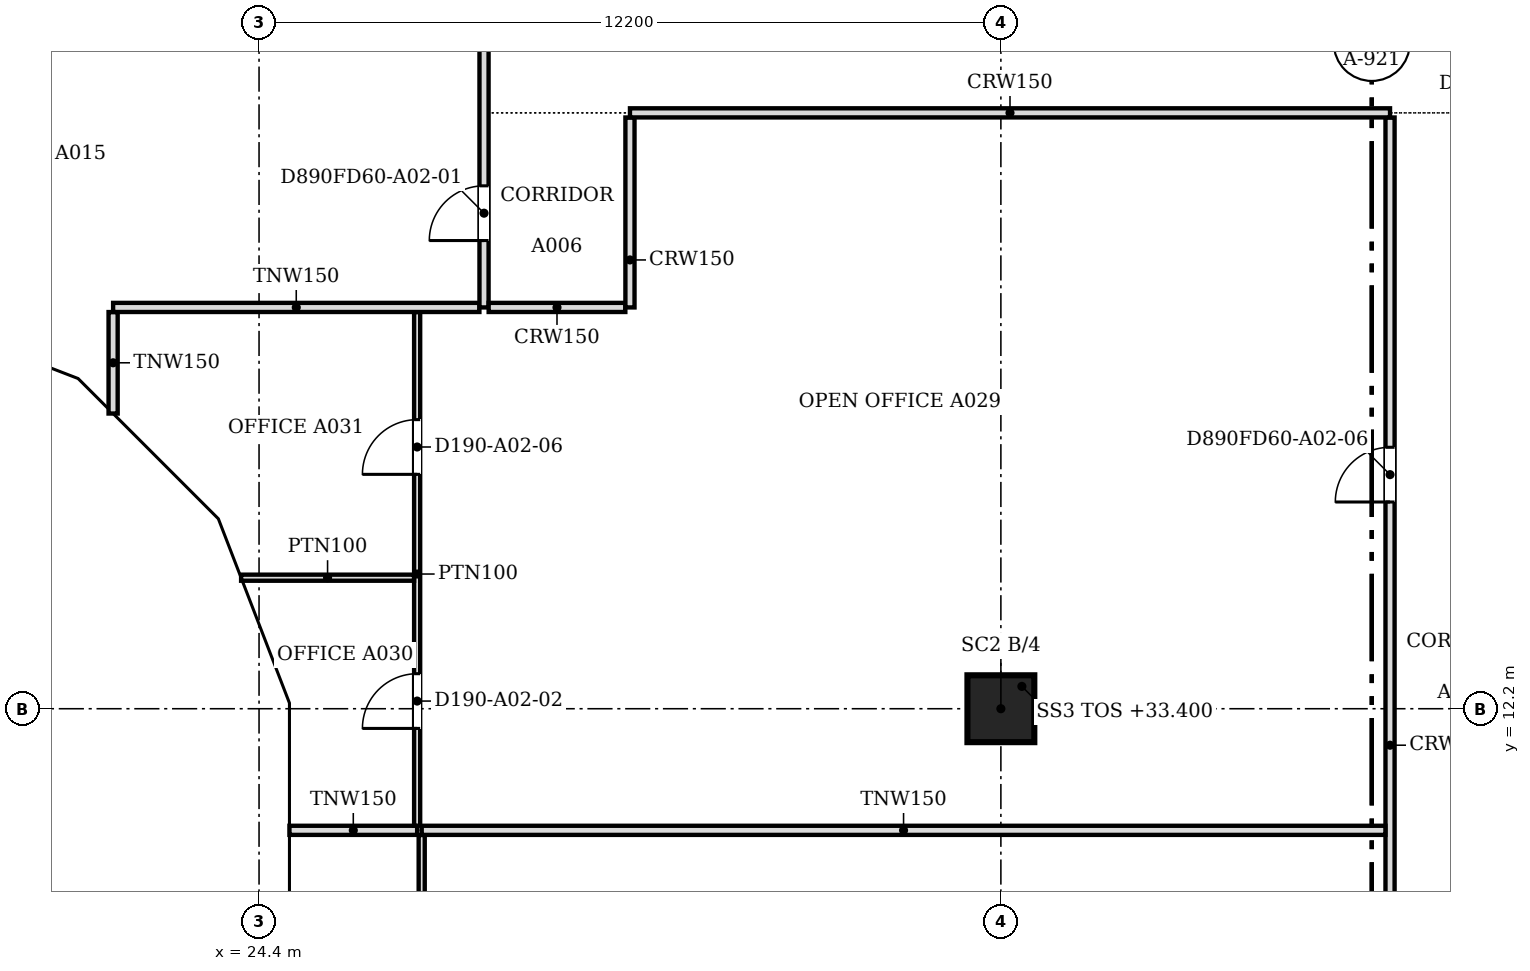
"""IFC4 building model, lengths in metres.
Left out: names, types, materials, properties, quantities, classifications, styles, units other than length and angle.
Written with IfcOpenShell. Run it as: python <this file> out.ifc"""

import sys

from ifc_helpers import new_model, si_unit, direction, frame, frame_2d, origin, origin_2d, place, context, subcontext, project, spatial, polyline, rectangle, outline, extrude, faceted_brep, source, transform, mapped, element, fill, save


model = new_model("IFC4")
c1 = context("Model", 3, precision=1e-05, world=origin(), true_north=direction((0.0, 1.0)))
c2 = subcontext(c1, "Body", "Model", "MODEL_VIEW")
j1 = project(units=[si_unit("LENGTHUNIT", "METRE"), si_unit("PLANEANGLEUNIT", "RADIAN")], contexts=[c1])
p1 = place(None, origin())
s1 = spatial("IfcSite", under=j1, at=p1, CompositionType="ELEMENT")
p2 = place(p1, origin())
s2 = spatial("IfcBuilding", under=s1, at=p2, CompositionType="ELEMENT")
p3 = place(p2, frame((0.0, 0.0, 33.4)))
s3 = spatial("IfcBuildingStorey", under=s2, at=p3, CompositionType="ELEMENT", Elevation=33.4)
p4 = place(p3, frame((36.6, 12.2, 0.0), z_axis=(0.0, 0.0, 1.0), x_axis=(1.0, 0.0, 0.0)))
e1 = element("IfcColumn", 1, at=p4, inside=s3, PredefinedType="COLUMN", context=c2, shape_type="SweptSolid", body=[
    extrude(rectangle(XDim=1.1, YDim=1.1, at=origin_2d()), origin(), (0.0, 0.0, 1.0), 3.6),
])
m1 = source(origin(), c2, "Body", "Brep", [
    faceted_brep([(0.093, -0.25, 0.056), (3.143, -0.25, 3.736), (3.143, -0.25, 3.864), (0.093, -0.25, 7.544), (0.0, 0.25, 7.543), (0.047, 0.25, 7.6), (3.196, 0.25, 3.8), (0.047, 0.25, 0.0), (0.0, 0.25, 0.057), (3.196, -0.0, 3.8), (0.047, 0.0, 0.0), (0.047, 0.0, 7.6)], [[[0, 1, 2, 3]], [[4, 5, 6, 7, 8]], [[7, 6, 9, 1, 0, 10]], [[6, 5, 11, 3, 2, 9]], [[5, 4, 11]], [[8, 7, 10]], [[8, 10, 0, 3, 11, 4]], [[1, 9, 2]]]),
])
p5 = place(p3, frame((18.303, 18.567, -3.8), z_axis=(0.0, 0.0, 1.0), x_axis=(0.932978940178, -0.359930961693, 0.0)))
e2 = element("IfcWall", 2, at=p5, inside=s3, PredefinedType="SOLIDWALL", context=c2, shape_type="MappedRepresentation", body=[
    mapped(m1, transform((0.0, 0.0, 0.0), scale=1.0)),
])
m2 = source(origin(), c2, "Body", "SweptSolid", [
    extrude(outline(polyline([(0.247, 0.633), (2.871, 3.8), (0.247, 6.967), (0.247, 0.633)])), frame((0.0, 0.26, 0.0), z_axis=(0.0, -1.0, 0.0), x_axis=(1.0, 0.0, 0.0)), (0.0, 0.0, 1.0), 0.52),
])
p6 = place(p5, origin())
e3 = element("IfcOpeningElement", 3, at=p6, cuts=e2, PredefinedType="OPENING", context=c2, shape_type="MappedRepresentation", body=[
    mapped(m2, transform((0.0, 0.0, 0.0), scale=1.0)),
])
m3 = source(origin(), c2, "Body", "Brep", [
    faceted_brep([(3.103, -0.25, 7.536), (0.053, -0.25, 3.864), (0.053, -0.25, 3.736), (3.103, -0.25, 0.064), (0.0, 0.25, 3.8), (3.156, 0.25, 7.6), (3.209, 0.25, 7.536), (3.209, 0.25, 0.064), (3.156, 0.25, 0.0), (3.156, -0.0, 0.0), (3.156, -0.0, 7.6), (0.0, 0.0, 3.8)], [[[0, 1, 2, 3]], [[4, 5, 6, 7, 8]], [[8, 7, 9]], [[6, 5, 10]], [[5, 4, 11, 1, 0, 10]], [[4, 8, 9, 3, 2, 11]], [[11, 2, 1]], [[3, 9, 7, 6, 10, 0]]]),
])
p7 = place(p3, frame((21.285, 17.417, -3.8), z_axis=(0.0, 0.0, 1.0), x_axis=(0.707106781187, -0.707106781187, 0.0)))
e4 = element("IfcWall", 4, at=p7, inside=s3, PredefinedType="SOLIDWALL", context=c2, shape_type="MappedRepresentation", body=[
    mapped(m3, transform((0.0, 0.0, 0.0), scale=1.0)),
])
m4 = source(origin(), c2, "Body", "SweptSolid", [
    extrude(outline(polyline([(2.956, 6.968), (0.325, 3.8), (2.956, 0.632), (2.956, 6.968)])), frame((0.0, 0.26, 0.0), z_axis=(0.0, -1.0, 0.0), x_axis=(1.0, 0.0, 0.0)), (0.0, 0.0, 1.0), 0.52),
])
p8 = place(p7, origin())
e5 = element("IfcOpeningElement", 5, at=p8, cuts=e4, PredefinedType="OPENING", context=c2, shape_type="MappedRepresentation", body=[
    mapped(m4, transform((0.0, 0.0, 0.0), scale=1.0)),
])
m5 = source(origin(), c2, "Body", "Brep", [
    faceted_brep([(0.106, -0.25, 0.064), (3.156, -0.25, 3.744), (3.156, -0.25, 3.856), (0.106, -0.25, 7.536), (0.0, 0.25, 7.536), (0.053, 0.25, 7.6), (3.202, 0.25, 3.8), (0.053, 0.25, 0.0), (0.0, 0.25, 0.064), (3.202, -0.0, 3.8), (0.053, 0.0, 0.0), (0.053, 0.0, 7.6)], [[[0, 1, 2, 3]], [[4, 5, 6, 7, 8]], [[7, 6, 9, 1, 0, 10]], [[6, 5, 11, 3, 2, 9]], [[5, 4, 11]], [[8, 7, 10]], [[8, 10, 0, 3, 11, 4]], [[1, 9, 2]]]),
])
p9 = place(p3, frame((23.497, 15.234, -3.8), z_axis=(0.0, 0.0, 1.0), x_axis=(0.359913782069, -0.932985567668, 0.0)))
e6 = element("IfcWall", 6, at=p9, inside=s3, PredefinedType="SOLIDWALL", context=c2, shape_type="MappedRepresentation", body=[
    mapped(m5, transform((0.0, 0.0, 0.0), scale=1.0)),
])
m6 = source(origin(), c2, "Body", "SweptSolid", [
    extrude(outline(polyline([(0.253, 0.633), (2.878, 3.8), (0.253, 6.967), (0.253, 0.633)])), frame((0.0, 0.26, 0.0), z_axis=(0.0, -1.0, 0.0), x_axis=(1.0, 0.0, 0.0)), (0.0, 0.0, 1.0), 0.52),
])
p10 = place(p9, origin())
e7 = element("IfcOpeningElement", 7, at=p10, cuts=e6, PredefinedType="OPENING", context=c2, shape_type="MappedRepresentation", body=[
    mapped(m6, transform((0.0, 0.0, 0.0), scale=1.0)),
])
m7 = source(origin(), c2, "Body", "Brep", [
    faceted_brep([(3.096, -0.25, 0.0), (6.1, -0.25, 3.8), (3.096, -0.25, 7.6), (0.047, -0.25, 3.857), (0.047, -0.25, 3.743), (0.0, 0.25, 3.8), (3.096, 0.25, 7.6), (6.053, 0.25, 3.859), (6.053, 0.25, 3.741), (3.096, 0.25, 0.0), (6.1, -0.0, 3.8), (0.0, 0.0, 3.8)], [[[0, 1, 2, 3, 4]], [[5, 6, 7, 8, 9]], [[9, 8, 10, 1, 0]], [[7, 6, 2, 1, 10]], [[6, 5, 11, 3, 2]], [[5, 9, 0, 4, 11]], [[11, 4, 3]], [[10, 8, 7]]]),
])
p11 = place(p3, frame((24.65, 12.247, -3.8), z_axis=(0.0, 0.0, 1.0), x_axis=(0.0, -1.0, 0.0)))
e8 = element("IfcWall", 8, at=p11, inside=s3, PredefinedType="SOLIDWALL", context=c2, shape_type="MappedRepresentation", body=[
    mapped(m7, transform((0.0, 0.0, 0.0), scale=1.0)),
])
m8 = source(origin(), c2, "Body", "SweptSolid", [
    extrude(outline(polyline([(3.094, 0.399), (5.781, 3.8), (3.094, 7.2), (0.323, 3.8), (3.094, 0.399)])), frame((0.0, 0.26, 0.0), z_axis=(0.0, -1.0, 0.0), x_axis=(1.0, 0.0, 0.0)), (0.0, 0.0, 1.0), 0.52),
])
p12 = place(p11, origin())
e9 = element("IfcOpeningElement", 9, at=p12, cuts=e8, PredefinedType="OPENING", context=c2, shape_type="MappedRepresentation", body=[
    mapped(m8, transform((0.0, 0.0, 0.0), scale=1.0)),
])
p13 = place(p2, frame((0.0, 0.0, 37.2)))
s4 = spatial("IfcBuildingStorey", under=s2, at=p13, CompositionType="ELEMENT", Elevation=37.2)
m9 = source(origin(), c2, "Body", "Brep", [
    faceted_brep([(3.096, -0.25, 7.536), (0.047, -0.25, 3.856), (0.047, -0.25, 3.744), (3.096, -0.25, 0.064), (0.0, 0.25, 3.8), (3.149, 0.25, 7.6), (3.202, 0.25, 7.536), (3.202, 0.25, 0.064), (3.149, 0.25, 0.0), (3.149, -0.0, 0.0), (3.149, -0.0, 7.6), (0.0, 0.0, 3.8)], [[[0, 1, 2, 3]], [[4, 5, 6, 7, 8]], [[8, 7, 9]], [[6, 5, 10]], [[5, 4, 11, 1, 0, 10]], [[4, 8, 9, 3, 2, 11]], [[11, 2, 1]], [[3, 9, 7, 6, 10, 0]]]),
])
p14 = place(p13, frame((18.346, 18.55, -3.8), z_axis=(0.0, 0.0, 1.0), x_axis=(0.932985567668, -0.359913782069, 0.0)))
e10 = element("IfcWall", 10, at=p14, inside=s4, PredefinedType="SOLIDWALL", context=c2, shape_type="MappedRepresentation", body=[
    mapped(m9, transform((0.0, 0.0, 0.0), scale=1.0)),
])
m10 = source(origin(), c2, "Body", "SweptSolid", [
    extrude(outline(polyline([(2.949, 6.967), (0.325, 3.8), (2.949, 0.633), (2.949, 6.967)])), frame((0.0, 0.26, 0.0), z_axis=(0.0, -1.0, 0.0), x_axis=(1.0, 0.0, 0.0)), (0.0, 0.0, 1.0), 0.52),
])
p15 = place(p14, origin())
e11 = element("IfcOpeningElement", 11, at=p15, cuts=e10, PredefinedType="OPENING", context=c2, shape_type="MappedRepresentation", body=[
    mapped(m10, transform((0.0, 0.0, 0.0), scale=1.0)),
])
m11 = source(origin(), c2, "Body", "Brep", [
    faceted_brep([(0.106, -0.25, 0.064), (3.156, -0.25, 3.736), (3.156, -0.25, 3.864), (0.106, -0.25, 7.536), (0.0, 0.25, 7.536), (0.053, 0.25, 7.6), (3.209, 0.25, 3.8), (0.053, 0.25, 0.0), (0.0, 0.25, 0.064), (3.209, -0.0, 3.8), (0.053, 0.0, 0.0), (0.053, 0.0, 7.6)], [[[0, 1, 2, 3]], [[4, 5, 6, 7, 8]], [[7, 6, 9, 1, 0, 10]], [[6, 5, 11, 3, 2, 9]], [[5, 4, 11]], [[8, 7, 10]], [[8, 10, 0, 3, 11, 4]], [[1, 9, 2]]]),
])
p16 = place(p13, frame((21.248, 17.454, -3.8), z_axis=(0.0, 0.0, 1.0), x_axis=(0.707106781187, -0.707106781187, 0.0)))
e12 = element("IfcWall", 12, at=p16, inside=s4, PredefinedType="SOLIDWALL", context=c2, shape_type="MappedRepresentation", body=[
    mapped(m11, transform((0.0, 0.0, 0.0), scale=1.0)),
])
m12 = source(origin(), c2, "Body", "SweptSolid", [
    extrude(outline(polyline([(0.253, 0.632), (2.884, 3.8), (0.253, 6.968), (0.253, 0.632)])), frame((0.0, 0.26, 0.0), z_axis=(0.0, -1.0, 0.0), x_axis=(1.0, 0.0, 0.0)), (0.0, 0.0, 1.0), 0.52),
])
p17 = place(p16, origin())
e13 = element("IfcOpeningElement", 13, at=p17, cuts=e12, PredefinedType="OPENING", context=c2, shape_type="MappedRepresentation", body=[
    mapped(m12, transform((0.0, 0.0, 0.0), scale=1.0)),
])
m13 = source(origin(), c2, "Body", "Brep", [
    faceted_brep([(3.103, -0.25, 7.544), (0.053, -0.25, 3.864), (0.053, -0.25, 3.736), (3.103, -0.25, 0.056), (0.0, 0.25, 3.8), (3.149, 0.25, 7.6), (3.196, 0.25, 7.543), (3.196, 0.25, 0.057), (3.149, 0.25, 0.0), (3.149, -0.0, 0.0), (3.149, -0.0, 7.6), (0.0, 0.0, 3.8)], [[[0, 1, 2, 3]], [[4, 5, 6, 7, 8]], [[8, 7, 9]], [[6, 5, 10]], [[5, 4, 11, 1, 0, 10]], [[4, 8, 9, 3, 2, 11]], [[11, 2, 1]], [[3, 9, 7, 6, 10, 0]]]),
])
p18 = place(p13, frame((23.517, 15.185, -3.8), z_axis=(0.0, 0.0, 1.0), x_axis=(0.359864468756, -0.933004589553, 0.0)))
e14 = element("IfcWall", 14, at=p18, inside=s4, PredefinedType="SOLIDWALL", context=c2, shape_type="MappedRepresentation", body=[
    mapped(m13, transform((0.0, 0.0, 0.0), scale=1.0)),
])
p19 = place(p18, origin())
e15 = element("IfcOpeningElement", 15, at=p19, cuts=e14, PredefinedType="OPENING", context=c2, shape_type="MappedRepresentation", body=[
    mapped(m10, transform((0.0, 0.0, 0.0), scale=1.0)),
])
m14 = source(origin(), c2, "Body", "Brep", [
    faceted_brep([(0.093, -0.25, 0.057), (3.143, -0.25, 3.8), (0.093, -0.25, 7.543), (0.0, 0.25, 7.544), (0.047, 0.25, 7.6), (3.143, 0.25, 3.8), (0.047, 0.25, 0.0), (0.0, 0.25, 0.056), (0.047, 0.0, 0.0), (0.047, 0.0, 7.6)], [[[0, 1, 2]], [[3, 4, 5, 6, 7]], [[6, 5, 1, 0, 8]], [[5, 4, 9, 2, 1]], [[4, 3, 9]], [[7, 6, 8]], [[7, 8, 0, 2, 9, 3]]]),
])
p20 = place(p13, frame((24.65, 12.293, -3.8), z_axis=(0.0, 0.0, 1.0), x_axis=(0.0, -1.0, 0.0)))
e16 = element("IfcWall", 16, at=p20, inside=s4, PredefinedType="SOLIDWALL", context=c2, shape_type="MappedRepresentation", body=[
    mapped(m14, transform((0.0, 0.0, 0.0), scale=1.0)),
])
m15 = source(origin(), c2, "Body", "SweptSolid", [
    extrude(outline(polyline([(0.247, 0.641), (2.821, 3.8), (0.247, 6.959), (0.247, 0.641)])), frame((0.0, 0.26, 0.0), z_axis=(0.0, -1.0, 0.0), x_axis=(1.0, 0.0, 0.0)), (0.0, 0.0, 1.0), 0.52),
])
p21 = place(p20, origin())
e17 = element("IfcOpeningElement", 17, at=p21, cuts=e16, PredefinedType="OPENING", context=c2, shape_type="MappedRepresentation", body=[
    mapped(m15, transform((0.0, 0.0, 0.0), scale=1.0)),
])
p22 = place(p3, frame((43.0, 0.5, 0.0), z_axis=(0.0, 0.0, 1.0), x_axis=(0.0, 1.0, 0.0)))
e18 = element("IfcWall", 18, at=p22, inside=s3, PredefinedType="PARTITIONING", context=c2, shape_type="SweptSolid", body=[
    extrude(rectangle(XDim=21.424, YDim=0.15, at=frame_2d((10.712, 0.0))), origin(), (0.0, 0.0, 1.0), 3.067),
])
m16 = source(origin(), c2, "Body", "SweptSolid", [
    extrude(rectangle(XDim=0.9, YDim=2.1, at=frame_2d((0.45, 1.05))), frame((0.0, 0.085, 0.0), z_axis=(0.0, -1.0, 0.0), x_axis=(1.0, 0.0, 0.0)), (0.0, 0.0, 1.0), 0.17),
])
p23 = place(p22, frame((6.2, 0.0, 0.0)))
e19 = element("IfcOpeningElement", 19, at=p23, cuts=e18, PredefinedType="OPENING", context=c2, shape_type="MappedRepresentation", body=[
    mapped(m16, transform((0.0, 0.0, 0.0), scale=1.0)),
])
p24 = place(p22, frame((15.1, 0.0, 0.0)))
e20 = element("IfcOpeningElement", 20, at=p24, cuts=e18, PredefinedType="OPENING", context=c2, shape_type="MappedRepresentation", body=[
    mapped(m16, transform((0.0, 0.0, 0.0), scale=1.0)),
])
p25 = place(p3, frame((27.075, 4.2, 0.0), z_axis=(0.0, 0.0, 1.0), x_axis=(0.0, 1.0, 0.0)))
e21 = element("IfcWall", 21, at=p25, inside=s3, PredefinedType="PARTITIONING", context=c2, shape_type="SweptSolid", body=[
    extrude(rectangle(XDim=5.924, YDim=0.1, at=frame_2d((2.962, 0.0))), origin(), (0.0, 0.0, 1.0), 3.067),
])
m17 = source(origin(), c2, "Body", "SweptSolid", [
    extrude(rectangle(XDim=0.9, YDim=2.1, at=frame_2d((0.45, 1.05))), frame((0.0, 0.06, 0.0), z_axis=(0.0, -1.0, 0.0), x_axis=(1.0, 0.0, 0.0)), (0.0, 0.0, 1.0), 0.12),
])
p26 = place(p25, frame((2.5, 0.0, 0.0)))
e22 = element("IfcOpeningElement", 22, at=p26, cuts=e21, PredefinedType="OPENING", context=c2, shape_type="MappedRepresentation", body=[
    mapped(m17, transform((0.0, 0.0, 0.0), scale=1.0)),
])
p27 = place(p3, frame((24.9, 10.2, 0.0), z_axis=(0.0, 0.0, 1.0), x_axis=(1.0, 0.0, 0.0)))
e23 = element("IfcWall", 23, at=p27, inside=s3, PredefinedType="PARTITIONING", context=c2, shape_type="SweptSolid", body=[
    extrude(rectangle(XDim=2.1, YDim=0.15, at=frame_2d((1.05, 0.0))), origin(), (0.0, 0.0, 1.0), 3.067),
])
p28 = place(p3, frame((27.075, 10.2, 0.0), z_axis=(0.0, 0.0, 1.0), x_axis=(1.0, 0.0, 0.0)))
e24 = element("IfcWall", 24, at=p28, inside=s3, PredefinedType="PARTITIONING", context=c2, shape_type="SweptSolid", body=[
    extrude(rectangle(XDim=15.849, YDim=0.15, at=frame_2d((7.925, 0.0))), origin(), (0.0, 0.0, 1.0), 3.067),
])
p29 = place(p3, frame((27.0, 10.276, 0.0), z_axis=(0.0, 0.0, 1.0), x_axis=(0.0, 1.0, 0.0)))
e25 = element("IfcWall", 25, at=p29, inside=s3, PredefinedType="PARTITIONING", context=c2, shape_type="SweptSolid", body=[
    extrude(rectangle(XDim=8.448, YDim=0.1, at=frame_2d((4.224, 0.0))), origin(), (0.0, 0.0, 1.0), 3.067),
])
p30 = place(p29, frame((1.6, 0.0, 0.0)))
e26 = element("IfcOpeningElement", 26, at=p30, cuts=e25, PredefinedType="OPENING", context=c2, shape_type="MappedRepresentation", body=[
    mapped(m17, transform((0.0, 0.0, 0.0), scale=1.0)),
])
p31 = place(p29, frame((5.779, 0.0, 0.0)))
e27 = element("IfcOpeningElement", 27, at=p31, cuts=e25, PredefinedType="OPENING", context=c2, shape_type="MappedRepresentation", body=[
    mapped(m17, transform((0.0, 0.0, 0.0), scale=1.0)),
])
p32 = place(p3, frame((24.105, 14.355, 0.0), z_axis=(0.0, 0.0, 1.0), x_axis=(1.0, 0.0, 0.0)))
e28 = element("IfcWall", 28, at=p32, inside=s3, PredefinedType="PARTITIONING", context=c2, shape_type="SweptSolid", body=[
    extrude(rectangle(XDim=2.844, YDim=0.1, at=frame_2d((1.422, 0.0))), origin(), (0.0, 0.0, 1.0), 3.067),
])
p33 = place(p3, frame((22.0, 17.055, 0.0), z_axis=(0.0, 0.0, 1.0), x_axis=(0.0, 1.0, 0.0)))
e29 = element("IfcWall", 29, at=p33, inside=s3, PredefinedType="PARTITIONING", context=c2, shape_type="SweptSolid", body=[
    extrude(rectangle(XDim=1.669, YDim=0.15, at=frame_2d((0.834, 0.0))), origin(), (0.0, 0.0, 1.0), 3.067),
])
p34 = place(p3, frame((22.0, 18.8, 0.0), z_axis=(0.0, 0.0, 1.0), x_axis=(1.0, 0.0, 0.0)))
e30 = element("IfcWall", 30, at=p34, inside=s3, PredefinedType="PARTITIONING", context=c2, shape_type="SweptSolid", body=[
    extrude(rectangle(XDim=6.024, YDim=0.15, at=frame_2d((3.012, 0.0))), origin(), (0.0, 0.0, 1.0), 3.067),
])
p35 = place(p3, frame((28.1, 18.8, 0.0), z_axis=(0.0, 0.0, 1.0), x_axis=(0.0, 1.0, 0.0)))
e31 = element("IfcWall", 31, at=p35, inside=s3, PredefinedType="PARTITIONING", context=c2, shape_type="SweptSolid", body=[
    extrude(rectangle(XDim=26.5, YDim=0.15, at=frame_2d((13.25, 0.0))), origin(), (0.0, 0.0, 1.0), 3.067),
])
p36 = place(p35, frame((1.1, 0.0, 0.0)))
e32 = element("IfcOpeningElement", 32, at=p36, cuts=e31, PredefinedType="OPENING", context=c2, shape_type="MappedRepresentation", body=[
    mapped(m16, transform((0.0, 0.0, 0.0), scale=1.0)),
])
m18 = source(origin(), c2, "Body", "SweptSolid", [
    extrude(rectangle(XDim=1.0, YDim=2.1, at=frame_2d((0.5, 1.05))), frame((0.0, 0.085, 0.0), z_axis=(0.0, -1.0, 0.0), x_axis=(1.0, 0.0, 0.0)), (0.0, 0.0, 1.0), 0.17),
])
p37 = place(p35, frame((23.151, 0.0, 0.0)))
e33 = element("IfcOpeningElement", 33, at=p37, cuts=e31, PredefinedType="OPENING", context=c2, shape_type="MappedRepresentation", body=[
    mapped(m18, transform((0.0, 0.0, 0.0), scale=1.0)),
])
p38 = place(p35, frame((8.2, 0.0, 0.0)))
e34 = element("IfcOpeningElement", 34, at=p38, cuts=e31, PredefinedType="OPENING", context=c2, shape_type="MappedRepresentation", body=[
    mapped(m16, transform((0.0, 0.0, 0.0), scale=1.0)),
])
p39 = place(p35, frame((15.8, 0.0, 0.0)))
e35 = element("IfcOpeningElement", 35, at=p39, cuts=e31, PredefinedType="OPENING", context=c2, shape_type="MappedRepresentation", body=[
    mapped(m18, transform((0.0, 0.0, 0.0), scale=1.0)),
])
p40 = place(p3, frame((28.176, 18.8, 0.0), z_axis=(0.0, 0.0, 1.0), x_axis=(1.0, 0.0, 0.0)))
e36 = element("IfcWall", 36, at=p40, inside=s3, PredefinedType="PARTITIONING", context=c2, shape_type="SweptSolid", body=[
    extrude(rectangle(XDim=2.248, YDim=0.15, at=frame_2d((1.124, 0.0))), origin(), (0.0, 0.0, 1.0), 3.067),
])
p41 = place(p3, frame((30.5, 18.8, 0.0), z_axis=(0.0, 0.0, 1.0), x_axis=(0.0, 1.0, 0.0)))
e37 = element("IfcWall", 37, at=p41, inside=s3, PredefinedType="PARTITIONING", context=c2, shape_type="SweptSolid", body=[
    extrude(rectangle(XDim=3.124, YDim=0.15, at=frame_2d((1.562, 0.0))), origin(), (0.0, 0.0, 1.0), 3.067),
])
p42 = place(p3, frame((30.5, 22.0, 0.0), z_axis=(0.0, 0.0, 1.0), x_axis=(1.0, 0.0, 0.0)))
e38 = element("IfcWall", 38, at=p42, inside=s3, PredefinedType="PARTITIONING", context=c2, shape_type="SweptSolid", body=[
    extrude(rectangle(XDim=12.5, YDim=0.15, at=frame_2d((6.25, 0.0))), origin(), (0.0, 0.0, 1.0), 3.067),
])
m19 = source(origin(), c2, "Body", "SweptSolid", [
    extrude(rectangle(XDim=0.9, YDim=2.1, at=frame_2d((0.45, 1.05))), frame((0.0, 0.025, 0.0), z_axis=(0.0, -1.0, 0.0), x_axis=(1.0, 0.0, 0.0)), (0.0, 0.0, 1.0), 0.05),
])
p43 = place(p36, origin())
e39 = element("IfcDoor", 39, at=p43, inside=s3, OperationType="SINGLE_SWING_LEFT", PredefinedType="DOOR", context=c2, shape_type="MappedRepresentation", body=[
    mapped(m19, transform((0.0, 0.0, 0.0), scale=1.0)),
])
fill(e32, e39)
p44 = place(p30, origin())
e40 = element("IfcDoor", 40, at=p44, inside=s3, OperationType="SINGLE_SWING_LEFT", PredefinedType="DOOR", context=c2, shape_type="MappedRepresentation", body=[
    mapped(m19, transform((0.0, 0.0, 0.0), scale=1.0)),
])
fill(e26, e40)
p45 = place(p31, origin())
e41 = element("IfcDoor", 41, at=p45, inside=s3, OperationType="SINGLE_SWING_LEFT", PredefinedType="DOOR", context=c2, shape_type="MappedRepresentation", body=[
    mapped(m19, transform((0.0, 0.0, 0.0), scale=1.0)),
])
fill(e27, e41)
p46 = place(p24, origin())
e42 = element("IfcDoor", 42, at=p46, inside=s3, OperationType="SINGLE_SWING_LEFT", PredefinedType="DOOR", context=c2, shape_type="MappedRepresentation", body=[
    mapped(m19, transform((0.0, 0.0, 0.0), scale=1.0)),
])
fill(e20, e42)
save(model, sys.argv[1])
